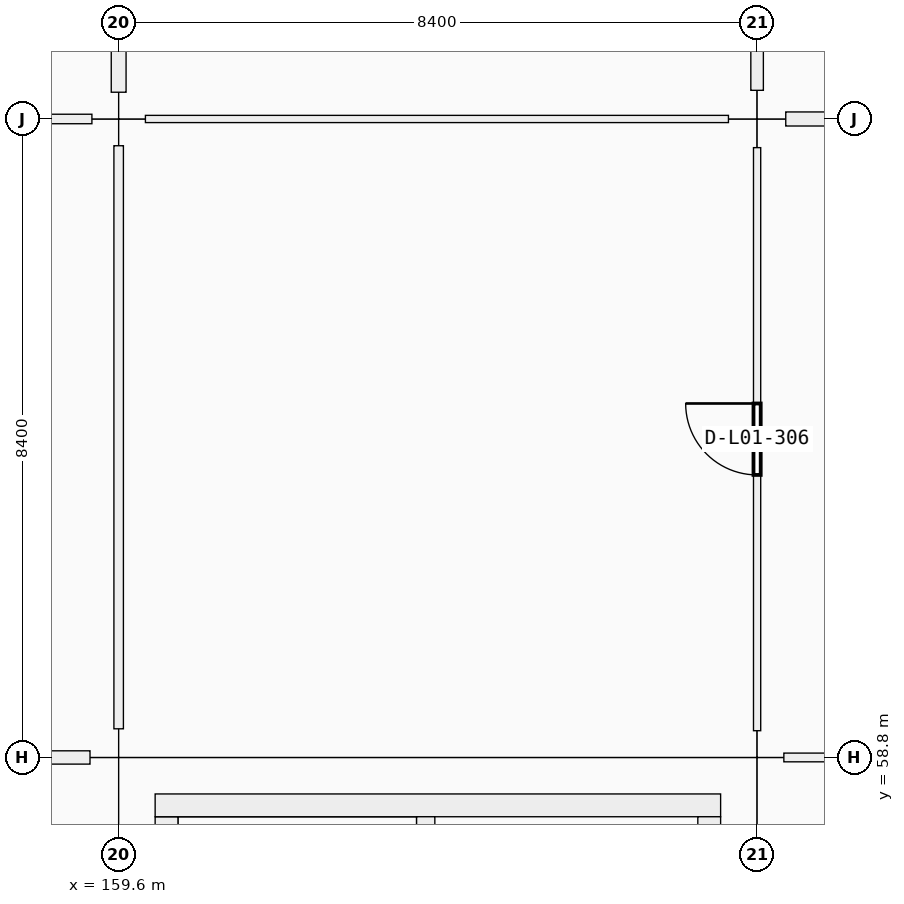
"""IFC4 building model, lengths in metres.
Left out: names, types, materials, properties, quantities, classifications, styles, units other than length and angle.
Written with IfcOpenShell. Run it as: python <this file> out.ifc"""

import sys

from ifc_helpers import new_model, si_unit, direction, frame, frame_2d, origin, origin_2d, place, context, subcontext, project, spatial, rectangle, extrude, element, fill, save


model = new_model("IFC4")
c1 = context("Model", 3, precision=1e-05, world=origin(), true_north=direction((0.0, 1.0)))
c2 = subcontext(c1, "Body", "Model", "MODEL_VIEW")
j1 = project(units=[si_unit("LENGTHUNIT", "METRE"), si_unit("PLANEANGLEUNIT", "RADIAN")], contexts=[c1])
p1 = place(None, origin())
s1 = spatial("IfcSite", under=j1, at=p1, CompositionType="ELEMENT")
p2 = place(p1, origin())
s2 = spatial("IfcBuilding", under=s1, at=p2, CompositionType="ELEMENT")
p3 = place(p2, frame((0.0, 0.0, 5.76)))
s3 = spatial("IfcBuildingStorey", under=s2, at=p3, CompositionType="ELEMENT", Elevation=5.76)
p4 = place(p3, frame((159.6, 58.8, 0.0), z_axis=(0.0, 0.0, 1.0), x_axis=(1.0, 0.0, 0.0)))
e1 = element("IfcColumn", 1, at=p4, inside=s3, PredefinedType="COLUMN", context=c2, shape_type="SweptSolid", body=[
    extrude(rectangle(XDim=0.75, YDim=0.75, at=origin_2d()), origin(), (0.0, 0.0, 1.0), 4.5),
])
for number, where, z_axis, x_axis in (
    (2, (159.6, 67.2, 0.0), (0.0, 0.0, 1.0), (1.0, 0.0, 0.0)),
    (3, (168.0, 58.8, 0.0), (0.0, 0.0, 1.0), (1.0, 0.0, 0.0)),
):
    element("IfcColumn", number, at=place(p3, frame(where, z_axis=z_axis, x_axis=x_axis)), inside=s3, PredefinedType="COLUMN", context=c2, shape_type="SweptSolid", body=[
        extrude(rectangle(XDim=0.7, YDim=0.7, at=origin_2d()), origin(), (0.0, 0.0, 1.0), 4.5),
    ])
p5 = place(p3, frame((168.0, 67.2, 0.0), z_axis=(0.0, 0.0, 1.0), x_axis=(1.0, 0.0, 0.0)))
e4 = element("IfcColumn", 4, at=p5, inside=s3, PredefinedType="COLUMN", context=c2, shape_type="SweptSolid", body=[
    extrude(rectangle(XDim=0.75, YDim=0.75, at=origin_2d()), origin(), (0.0, 0.0, 1.0), 4.5),
])
p6 = place(p3, frame((160.23, 51.18, 0.0), z_axis=(0.0, 0.0, 1.0), x_axis=(0.0, 1.0, 0.0)))
e5 = element("IfcWall", 5, at=p6, inside=s3, PredefinedType="SHEAR", context=c2, shape_type="SweptSolid", body=[
    extrude(rectangle(XDim=6.84, YDim=0.3, at=frame_2d((3.42, 0.0))), origin(), (0.0, 0.0, 1.0), 4.5),
])
p7 = place(p3, frame((160.08, 58.17, 0.0), z_axis=(0.0, 0.0, 1.0), x_axis=(1.0, 0.0, 0.0)))
e6 = element("IfcWall", 6, at=p7, inside=s3, PredefinedType="SHEAR", context=c2, shape_type="SweptSolid", body=[
    extrude(rectangle(XDim=7.44, YDim=0.3, at=frame_2d((3.72, 0.0))), origin(), (0.0, 0.0, 1.0), 4.5),
])
p8 = place(p3, frame((167.37, 58.02, 0.0), z_axis=(0.0, 0.0, 1.0), x_axis=(0.0, -1.0, 0.0)))
e7 = element("IfcWall", 7, at=p8, inside=s3, PredefinedType="SHEAR", context=c2, shape_type="SweptSolid", body=[
    extrude(rectangle(XDim=6.84, YDim=0.3, at=frame_2d((3.42, 0.0))), origin(), (0.0, 0.0, 1.0), 4.5),
])
p9 = place(p3, frame((163.64, 51.18, 0.0), z_axis=(0.0, 0.0, 1.0), x_axis=(0.0, 1.0, 0.0)))
e8 = element("IfcWall", 8, at=p9, inside=s3, PredefinedType="SHEAR", context=c2, shape_type="SweptSolid", body=[
    extrude(rectangle(XDim=6.84, YDim=0.24, at=frame_2d((3.42, 0.0))), origin(), (0.0, 0.0, 1.0), 4.5),
])
p10 = place(p9, frame((0.12, 0.0, 0.0)))
e9 = element("IfcOpeningElement", 9, at=p10, cuts=e8, PredefinedType="OPENING", context=c2, shape_type="SweptSolid", body=[
    extrude(rectangle(XDim=1.0, YDim=2.15, at=frame_2d((0.5, 1.075))), frame((0.0, 0.12, 0.0), z_axis=(0.0, -1.0, 0.0), x_axis=(1.0, 0.0, 0.0)), (0.0, 0.0, 1.0), 0.24),
])
p11 = place(p3, frame((151.552, 58.8, 0.0), z_axis=(0.0, 0.0, 1.0), x_axis=(1.0, 0.0, 0.0)))
e10 = element("IfcWall", 10, at=p11, inside=s3, PredefinedType="PARTITIONING", context=c2, shape_type="SweptSolid", body=[
    extrude(rectangle(XDim=7.671, YDim=0.175, at=frame_2d((3.835, 0.0))), origin(), (0.0, 0.0, 1.0), 2.4),
])
p12 = place(p11, frame((3.376, 0.0, 0.0)))
e11 = element("IfcOpeningElement", 11, at=p12, cuts=e10, PredefinedType="OPENING", context=c2, shape_type="SweptSolid", body=[
    extrude(rectangle(XDim=0.92, YDim=2.15, at=frame_2d((0.46, 1.075))), frame((0.0, 0.087, 0.0), z_axis=(0.0, -1.0, 0.0), x_axis=(1.0, 0.0, 0.0)), (0.0, 0.0, 1.0), 0.175),
])
p13 = place(p3, frame((151.577, 67.2, 0.0), z_axis=(0.0, 0.0, 1.0), x_axis=(1.0, 0.0, 0.0)))
e12 = element("IfcWall", 12, at=p13, inside=s3, PredefinedType="PARTITIONING", context=c2, shape_type="SweptSolid", body=[
    extrude(rectangle(XDim=7.671, YDim=0.125, at=frame_2d((3.835, 0.0))), origin(), (0.0, 0.0, 1.0), 2.4),
])
p14 = place(p13, frame((3.311, 0.0, 0.0)))
e13 = element("IfcOpeningElement", 13, at=p14, cuts=e12, PredefinedType="OPENING", context=c2, shape_type="SweptSolid", body=[
    extrude(rectangle(XDim=1.05, YDim=2.12, at=frame_2d((0.525, 1.06))), frame((0.0, 0.062, 0.0), z_axis=(0.0, -1.0, 0.0), x_axis=(1.0, 0.0, 0.0)), (0.0, 0.0, 1.0), 0.125),
])
p15 = place(p3, frame((159.952, 67.2, 0.0), z_axis=(0.0, 0.0, 1.0), x_axis=(1.0, 0.0, 0.0)))
e14 = element("IfcWall", 14, at=p15, inside=s3, PredefinedType="PARTITIONING", context=c2, shape_type="SweptSolid", body=[
    extrude(rectangle(XDim=7.671, YDim=0.095, at=frame_2d((3.835, 0.0))), origin(), (0.0, 0.0, 1.0), 2.4),
])
p16 = place(p15, frame((3.351, 0.0, 0.0)))
e15 = element("IfcOpeningElement", 15, at=p16, cuts=e14, PredefinedType="OPENING", context=c2, shape_type="SweptSolid", body=[
    extrude(rectangle(XDim=0.97, YDim=2.12, at=frame_2d((0.485, 1.06))), frame((0.0, 0.047, 0.0), z_axis=(0.0, -1.0, 0.0), x_axis=(1.0, 0.0, 0.0)), (0.0, 0.0, 1.0), 0.095),
])
p17 = place(p3, frame((168.352, 58.8, 0.0), z_axis=(0.0, 0.0, 1.0), x_axis=(1.0, 0.0, 0.0)))
e16 = element("IfcWall", 16, at=p17, inside=s3, PredefinedType="PARTITIONING", context=c2, shape_type="SweptSolid", body=[
    extrude(rectangle(XDim=7.771, YDim=0.115, at=frame_2d((3.885, 0.0))), origin(), (0.0, 0.0, 1.0), 2.4),
])
p18 = place(p17, frame((3.385, 0.0, 0.0)))
e17 = element("IfcOpeningElement", 17, at=p18, cuts=e16, PredefinedType="OPENING", context=c2, shape_type="SweptSolid", body=[
    extrude(rectangle(XDim=1.0, YDim=2.2, at=frame_2d((0.5, 1.1))), frame((0.0, 0.058, 0.0), z_axis=(0.0, -1.0, 0.0), x_axis=(1.0, 0.0, 0.0)), (0.0, 0.0, 1.0), 0.115),
])
p19 = place(p3, frame((168.377, 67.2, 0.0), z_axis=(0.0, 0.0, 1.0), x_axis=(1.0, 0.0, 0.0)))
e18 = element("IfcWall", 18, at=p19, inside=s3, PredefinedType="PARTITIONING", context=c2, shape_type="SweptSolid", body=[
    extrude(rectangle(XDim=7.746, YDim=0.185, at=frame_2d((3.873, 0.0))), origin(), (0.0, 0.0, 1.0), 2.4),
])
p20 = place(p19, frame((3.383, 0.0, 0.0)))
e19 = element("IfcOpeningElement", 19, at=p20, cuts=e18, PredefinedType="OPENING", context=c2, shape_type="SweptSolid", body=[
    extrude(rectangle(XDim=0.98, YDim=2.18, at=frame_2d((0.49, 1.09))), frame((0.0, 0.093, 0.0), z_axis=(0.0, -1.0, 0.0), x_axis=(1.0, 0.0, 0.0)), (0.0, 0.0, 1.0), 0.185),
])
p21 = place(p3, frame((159.6, 59.177, 0.0), z_axis=(0.0, 0.0, 1.0), x_axis=(0.0, 1.0, 0.0)))
e20 = element("IfcWall", 20, at=p21, inside=s3, PredefinedType="PARTITIONING", context=c2, shape_type="SweptSolid", body=[
    extrude(rectangle(XDim=7.671, YDim=0.125, at=frame_2d((3.835, 0.0))), origin(), (0.0, 0.0, 1.0), 2.4),
])
p22 = place(p21, frame((3.331, 0.0, 0.0)))
e21 = element("IfcOpeningElement", 21, at=p22, cuts=e20, PredefinedType="OPENING", context=c2, shape_type="SweptSolid", body=[
    extrude(rectangle(XDim=1.01, YDim=2.12, at=frame_2d((0.505, 1.06))), frame((0.0, 0.062, 0.0), z_axis=(0.0, -1.0, 0.0), x_axis=(1.0, 0.0, 0.0)), (0.0, 0.0, 1.0), 0.125),
])
p23 = place(p3, frame((159.6, 67.552, 0.0), z_axis=(0.0, 0.0, 1.0), x_axis=(0.0, 1.0, 0.0)))
e22 = element("IfcWall", 22, at=p23, inside=s3, PredefinedType="PARTITIONING", context=c2, shape_type="SweptSolid", body=[
    extrude(rectangle(XDim=7.771, YDim=0.195, at=frame_2d((3.885, 0.0))), origin(), (0.0, 0.0, 1.0), 2.4),
])
p24 = place(p23, frame((3.365, 0.0, 0.0)))
e23 = element("IfcOpeningElement", 23, at=p24, cuts=e22, PredefinedType="OPENING", context=c2, shape_type="SweptSolid", body=[
    extrude(rectangle(XDim=1.04, YDim=2.2, at=frame_2d((0.52, 1.1))), frame((0.0, 0.098, 0.0), z_axis=(0.0, -1.0, 0.0), x_axis=(1.0, 0.0, 0.0)), (0.0, 0.0, 1.0), 0.195),
])
p25 = place(p3, frame((168.0, 59.152, 0.0), z_axis=(0.0, 0.0, 1.0), x_axis=(0.0, 1.0, 0.0)))
e24 = element("IfcWall", 24, at=p25, inside=s3, PredefinedType="PARTITIONING", context=c2, shape_type="SweptSolid", body=[
    extrude(rectangle(XDim=7.671, YDim=0.095, at=frame_2d((3.835, 0.0))), origin(), (0.0, 0.0, 1.0), 2.4),
])
p26 = place(p25, frame((3.365, 0.0, 0.0)))
e25 = element("IfcOpeningElement", 25, at=p26, cuts=e24, PredefinedType="OPENING", context=c2, shape_type="SweptSolid", body=[
    extrude(rectangle(XDim=0.94, YDim=2.15, at=frame_2d((0.47, 1.075))), frame((0.0, 0.047, 0.0), z_axis=(0.0, -1.0, 0.0), x_axis=(1.0, 0.0, 0.0)), (0.0, 0.0, 1.0), 0.095),
])
p27 = place(p3, frame((168.0, 67.577, 0.0), z_axis=(0.0, 0.0, 1.0), x_axis=(0.0, 1.0, 0.0)))
e26 = element("IfcWall", 26, at=p27, inside=s3, PredefinedType="PARTITIONING", context=c2, shape_type="SweptSolid", body=[
    extrude(rectangle(XDim=7.746, YDim=0.165, at=frame_2d((3.873, 0.0))), origin(), (0.0, 0.0, 1.0), 2.4),
])
p28 = place(p27, frame((3.413, 0.0, 0.0)))
e27 = element("IfcOpeningElement", 27, at=p28, cuts=e26, PredefinedType="OPENING", context=c2, shape_type="SweptSolid", body=[
    extrude(rectangle(XDim=0.92, YDim=2.15, at=frame_2d((0.46, 1.075))), frame((0.0, 0.083, 0.0), z_axis=(0.0, -1.0, 0.0), x_axis=(1.0, 0.0, 0.0)), (0.0, 0.0, 1.0), 0.165),
])
p29 = place(p16, origin())
e28 = element("IfcDoor", 28, at=p29, inside=s3, OperationType="SINGLE_SWING_LEFT", PredefinedType="DOOR", context=c2, shape_type="SweptSolid", body=[
    extrude(rectangle(XDim=0.97, YDim=2.12, at=frame_2d((0.485, 1.06))), frame((0.0, 0.025, 0.0), z_axis=(0.0, -1.0, 0.0), x_axis=(1.0, 0.0, 0.0)), (0.0, 0.0, 1.0), 0.05),
])
fill(e15, e28)
p30 = place(p22, origin())
e29 = element("IfcDoor", 29, at=p30, inside=s3, OperationType="SINGLE_SWING_RIGHT", PredefinedType="DOOR", context=c2, shape_type="SweptSolid", body=[
    extrude(rectangle(XDim=1.01, YDim=2.12, at=frame_2d((0.505, 1.06))), frame((0.0, 0.025, 0.0), z_axis=(0.0, -1.0, 0.0), x_axis=(1.0, 0.0, 0.0)), (0.0, 0.0, 1.0), 0.05),
])
fill(e21, e29)
p31 = place(p26, origin())
e30 = element("IfcDoor", 30, at=p31, inside=s3, OperationType="SINGLE_SWING_RIGHT", PredefinedType="DOOR", context=c2, shape_type="SweptSolid", body=[
    extrude(rectangle(XDim=0.94, YDim=2.15, at=frame_2d((0.47, 1.075))), frame((0.0, 0.025, 0.0), z_axis=(0.0, -1.0, 0.0), x_axis=(1.0, 0.0, 0.0)), (0.0, 0.0, 1.0), 0.05),
])
fill(e25, e30)
save(model, sys.argv[1])
